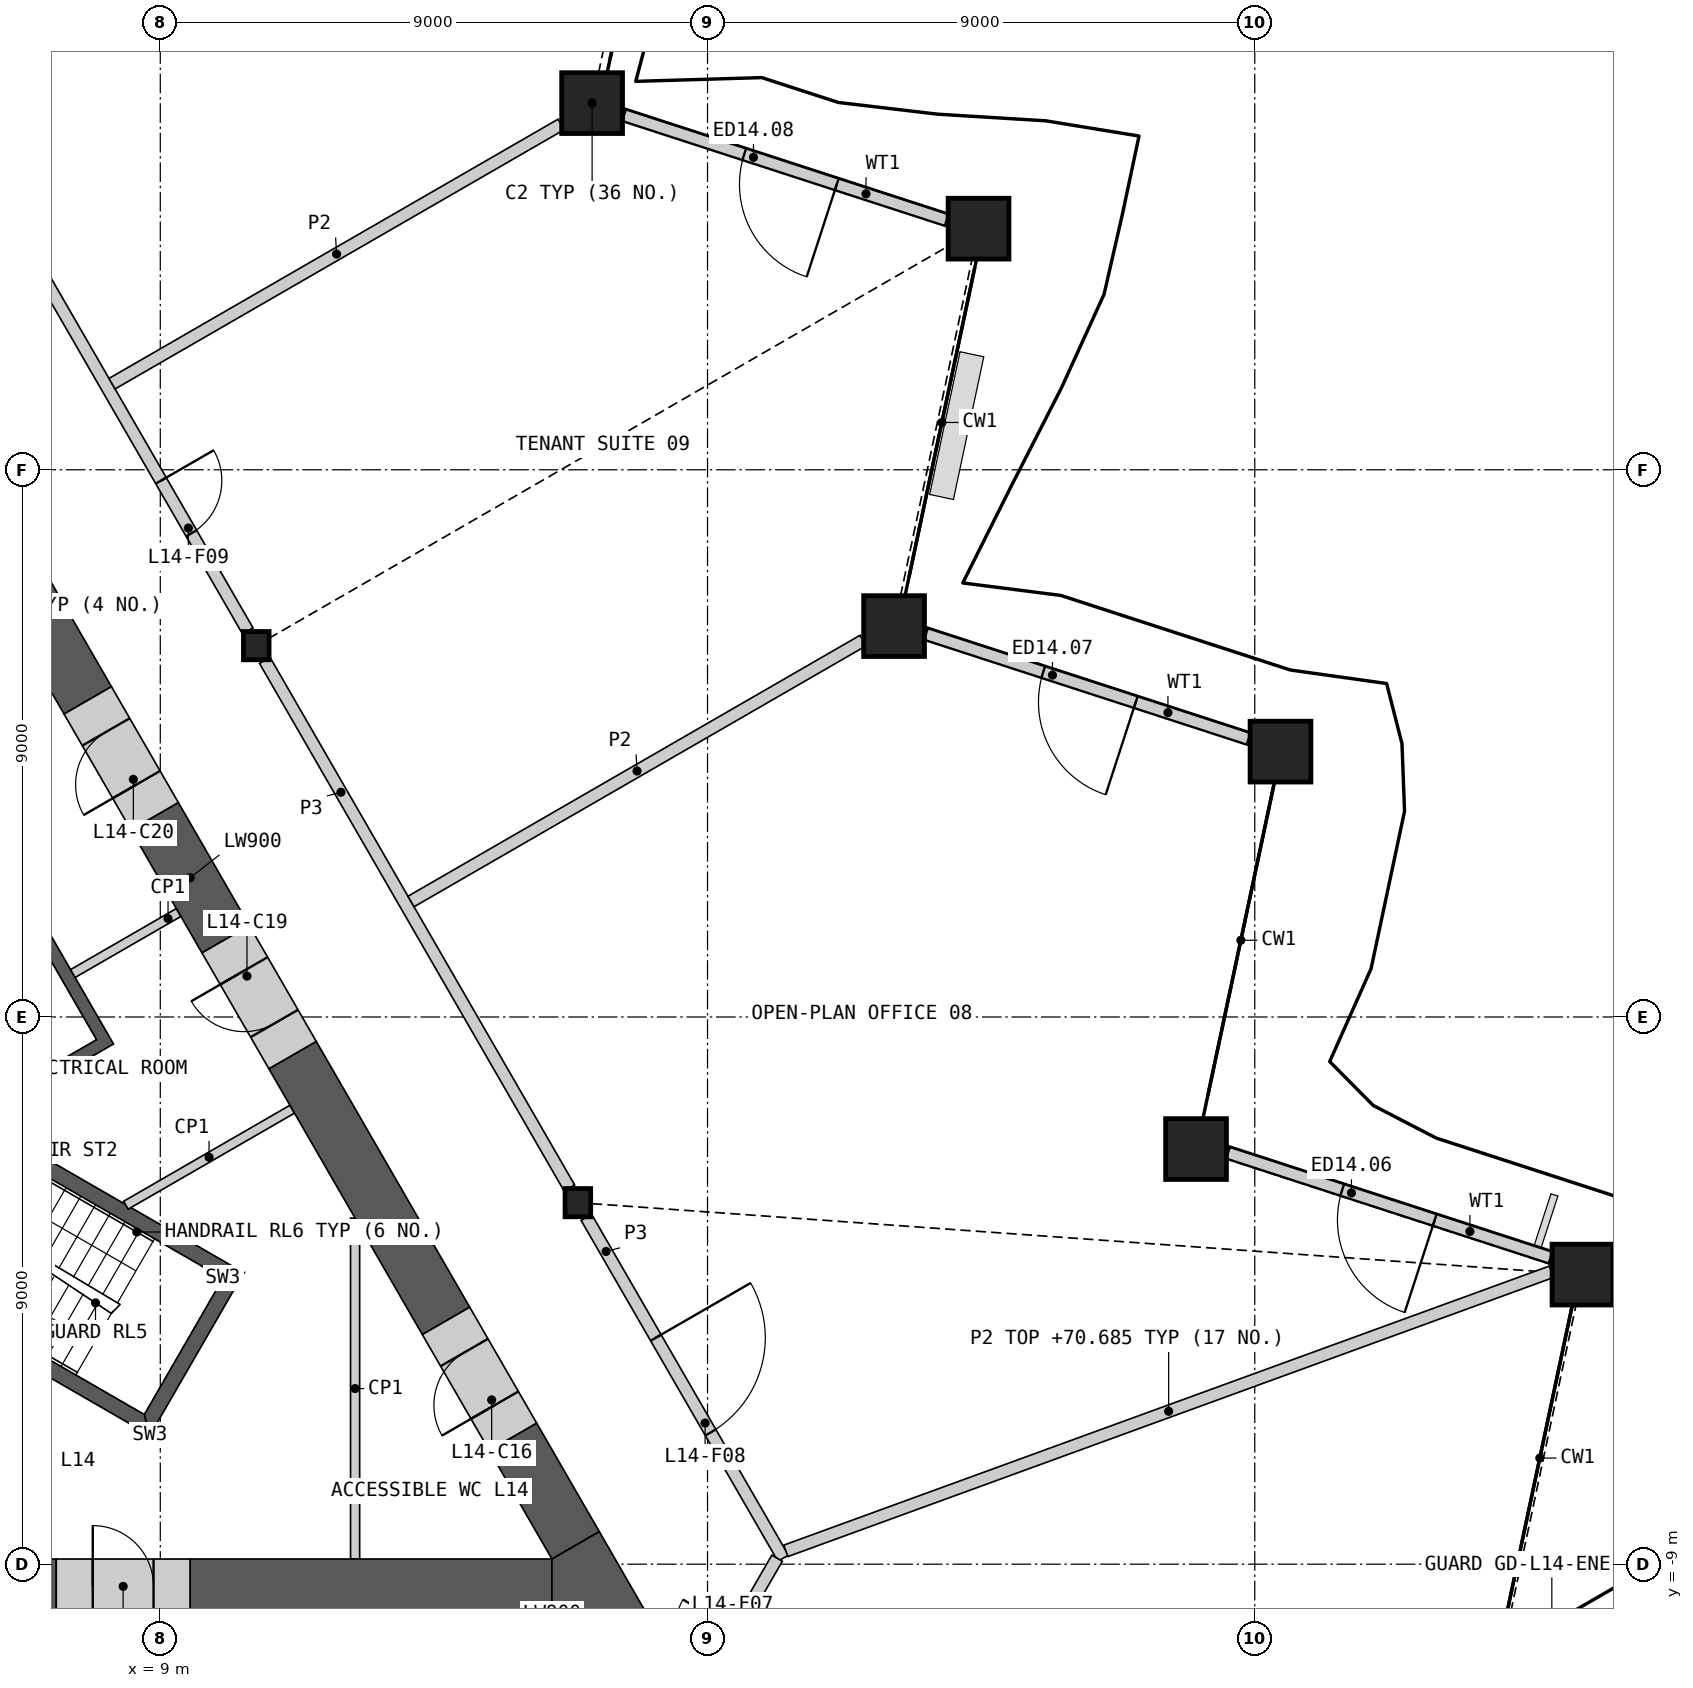
"""IFC4 building model, lengths in metres.
Left out: names, types, materials, properties, quantities, classifications, styles, units other than length and angle.
Written with IfcOpenShell. Run it as: python <this file> out.ifc"""

import sys

from ifc_helpers import new_model, si_unit, direction, frame, frame_2d, origin, origin_2d, place, context, subcontext, project, spatial, polyline, rectangle, hollow_rectangle, i_section, outline, extrude, element, fill, save


model = new_model("IFC4")
c1 = context("Model", 3, precision=1e-05, world=origin(), true_north=direction((0.0, 1.0)))
c2 = subcontext(c1, "Body", "Model", "MODEL_VIEW")
j1 = project(units=[si_unit("LENGTHUNIT", "METRE"), si_unit("PLANEANGLEUNIT", "RADIAN")], contexts=[c1])
p1 = place(None, origin())
s1 = spatial("IfcSite", under=j1, at=p1, CompositionType="ELEMENT")
p2 = place(p1, origin())
s2 = spatial("IfcBuilding", under=s1, at=p2, CompositionType="ELEMENT")
p3 = place(p2, frame((0.0, 0.0, 67.8)))
s3 = spatial("IfcBuildingStorey", under=s2, at=p3, CompositionType="ELEMENT", Elevation=67.8)
for number, where, z_axis, x_axis in (
    (1, (32.389, -4.237, 0.0), (0.0, 0.0, 1.0), (1.0, 0.0, 0.0)),
    (2, (26.034, -2.172, 0.0), (0.0, 0.0, 1.0), (1.0, 0.0, 0.0)),
    (3, (27.423, 4.364, 0.0), (0.0, 0.0, 1.0), (1.0, 0.0, 0.0)),
    (4, (21.068, 6.429, 0.0), (0.0, 0.0, 1.0), (1.0, 0.0, 0.0)),
    (5, (22.457, 12.966, 0.0), (0.0, 0.0, 1.0), (1.0, 0.0, 0.0)),
    (6, (16.102, 15.031, 0.0), (0.0, 0.0, 1.0), (1.0, 0.0, 0.0)),
):
    element("IfcColumn", number, at=place(p3, frame(where, z_axis=z_axis, x_axis=x_axis)), inside=s3, PredefinedType="COLUMN", context=c2, shape_type="SweptSolid", body=[
        extrude(hollow_rectangle(XDim=1.0, YDim=1.0, WallThickness=0.07, at=origin_2d()), origin(), (0.0, 0.0, 1.0), 4.2),
    ])
for number, where, z_axis, x_axis in (
    (7, (15.868, -3.054, 0.0), (0.0, 0.0, 1.0), (1.0, 0.0, 0.0)),
    (8, (10.578, 6.107, 0.0), (0.0, 0.0, 1.0), (1.0, 0.0, 0.0)),
):
    element("IfcColumn", number, at=place(p3, frame(where, z_axis=z_axis, x_axis=x_axis)), inside=s3, PredefinedType="COLUMN", context=c2, shape_type="SweptSolid", body=[
        extrude(i_section(OverallWidth=0.421, OverallDepth=0.465, WebThickness=0.045, FlangeThickness=0.072, at=origin_2d()), origin(), (0.0, 0.0, 1.0), 4.2),
    ])
p4 = place(p3, frame((31.865, -3.958, 0.0), z_axis=(0.0, 0.0, 1.0), x_axis=(-0.951066864375, 0.308985144444, 0.0)))
e9 = element("IfcWall", 9, at=p4, inside=s3, PredefinedType="SOLIDWALL", context=c2, shape_type="SweptSolid", body=[
    extrude(rectangle(XDim=5.579, YDim=0.2, at=frame_2d((2.79, 0.0))), origin(), (0.0, 0.0, 1.0), 3.189),
])
p5 = place(p4, frame((2.003, 0.0, 0.0)))
e10 = element("IfcOpeningElement", 10, at=p5, cuts=e9, PredefinedType="OPENING", context=c2, shape_type="SweptSolid", body=[
    extrude(rectangle(XDim=1.6, YDim=2.4, at=frame_2d((0.8, 1.2))), frame((0.0, 0.11, 0.0), z_axis=(0.0, -1.0, 0.0), x_axis=(1.0, 0.0, 0.0)), (0.0, 0.0, 1.0), 0.22),
])
p6 = place(p3, frame((26.899, 4.575, 0.0), z_axis=(0.0, 0.0, 1.0), x_axis=(-0.951066864375, 0.308985144444, 0.0)))
e11 = element("IfcWall", 11, at=p6, inside=s3, PredefinedType="SOLIDWALL", context=c2, shape_type="SweptSolid", body=[
    extrude(rectangle(XDim=5.579, YDim=0.2, at=frame_2d((2.79, 0.0))), origin(), (0.0, 0.0, 1.0), 3.189),
])
p7 = place(p6, frame((1.952, 0.0, 0.0)))
e12 = element("IfcOpeningElement", 12, at=p7, cuts=e11, PredefinedType="OPENING", context=c2, shape_type="SweptSolid", body=[
    extrude(rectangle(XDim=1.6, YDim=2.4, at=frame_2d((0.8, 1.2))), frame((0.0, 0.11, 0.0), z_axis=(0.0, -1.0, 0.0), x_axis=(1.0, 0.0, 0.0)), (0.0, 0.0, 1.0), 0.22),
])
p8 = place(p3, frame((21.933, 13.107, 0.0), z_axis=(0.0, 0.0, 1.0), x_axis=(-0.951066864375, 0.308985144444, 0.0)))
e13 = element("IfcWall", 13, at=p8, inside=s3, PredefinedType="SOLIDWALL", context=c2, shape_type="SweptSolid", body=[
    extrude(rectangle(XDim=5.579, YDim=0.2, at=frame_2d((2.79, 0.0))), origin(), (0.0, 0.0, 1.0), 3.189),
])
p9 = place(p8, frame((1.9, 0.0, 0.0)))
e14 = element("IfcOpeningElement", 14, at=p9, cuts=e13, PredefinedType="OPENING", context=c2, shape_type="SweptSolid", body=[
    extrude(rectangle(XDim=1.6, YDim=2.4, at=frame_2d((0.8, 1.2))), frame((0.0, 0.11, 0.0), z_axis=(0.0, -1.0, 0.0), x_axis=(1.0, 0.0, 0.0)), (0.0, 0.0, 1.0), 0.22),
])
p10 = place(p3, origin())
e15 = element("IfcWall", 15, at=p10, inside=s3, PredefinedType="SHEAR", context=c2, shape_type="SweptSolid", body=[
    extrude(outline(polyline([(2.66, 4.192), (4.831, 5.445), (8.231, -0.444), (6.061, -1.697), (5.96, -1.524), (7.952, -0.374), (6.952, 1.358), (4.96, 0.208), (4.861, 0.381), (6.852, 1.531), (5.852, 3.263), (3.861, 2.113), (3.76, 2.287), (5.752, 3.437), (4.752, 5.169), (2.76, 4.019), (2.66, 4.192)])), origin(), (0.0, 0.0, 1.0), 3.8),
])
p11 = place(p3, origin())
e16 = element("IfcWall", 16, at=p11, inside=s3, PredefinedType="SHEAR", context=c2, shape_type="SweptSolid", body=[
    extrude(outline(polyline([(3.763, -3.956), (8.83, -6.881), (8.738, -6.539), (3.888, -3.739), (3.763, -3.956)])), origin(), (0.0, 0.0, 1.0), 3.8),
])
p12 = place(p3, origin())
e17 = element("IfcWall", 17, at=p12, inside=s3, PredefinedType="SHEAR", context=c2, shape_type="SweptSolid", body=[
    extrude(outline(polyline([(8.83, -6.881), (10.374, -4.206), (10.032, -4.298), (8.738, -6.539), (8.83, -6.881)])), origin(), (0.0, 0.0, 1.0), 3.8),
])
p13 = place(p3, origin())
e18 = element("IfcWall", 18, at=p13, inside=s3, PredefinedType="SHEAR", context=c2, shape_type="SweptSolid", body=[
    extrude(outline(polyline([(10.032, -4.298), (10.374, -4.206), (5.307, -1.281), (5.182, -1.498), (10.032, -4.298)])), origin(), (0.0, 0.0, 1.0), 3.8),
])
p14 = place(p3, frame((9.302, 1.719, 0.0), z_axis=(0.0, 0.0, 1.0), x_axis=(-0.866035824272, -0.499981950752, 0.0)))
e19 = element("IfcWall", 19, at=p14, inside=s3, PredefinedType="PARTITIONING", context=c2, shape_type="SweptSolid", body=[
    extrude(rectangle(XDim=2.009, YDim=0.15, at=frame_2d((1.004, 0.0))), origin(), (0.0, 0.0, 1.0), 3.8),
])
p15 = place(p3, frame((11.17, -1.517, 0.0), z_axis=(0.0, 0.0, 1.0), x_axis=(-0.866037599206, -0.499978876315, 0.0)))
e20 = element("IfcWall", 20, at=p15, inside=s3, PredefinedType="PARTITIONING", context=c2, shape_type="SweptSolid", body=[
    extrude(rectangle(XDim=3.159, YDim=0.15, at=frame_2d((1.58, 0.0))), origin(), (0.0, 0.0, 1.0), 3.8),
])
p16 = place(p3, frame((12.204, -8.915, 0.0), z_axis=(0.0, 0.0, 1.0), x_axis=(0.0, 1.0, 0.0)))
e21 = element("IfcWall", 21, at=p16, inside=s3, PredefinedType="PARTITIONING", context=c2, shape_type="SweptSolid", body=[
    extrude(rectangle(XDim=5.607, YDim=0.15, at=frame_2d((2.804, 0.0))), origin(), (0.0, 0.0, 1.0), 3.8),
])
p17 = place(p3, frame((1.1, -9.365, 0.0), z_axis=(0.0, 0.0, 1.0), x_axis=(1.0, 0.0, 0.0)))
e22 = element("IfcWall", 22, at=p17, inside=s3, PredefinedType="SHEAR", context=c2, shape_type="SweptSolid", body=[
    extrude(rectangle(XDim=6.189, YDim=0.9, at=frame_2d((3.095, 0.0))), origin(), (0.0, 0.0, 1.0), 3.8),
])
p18 = place(p3, frame((9.49, -9.365, 0.0), z_axis=(0.0, 0.0, 1.0), x_axis=(1.0, 0.0, 0.0)))
e23 = element("IfcWall", 23, at=p18, inside=s3, PredefinedType="SHEAR", context=c2, shape_type="SweptSolid", body=[
    extrude(rectangle(XDim=5.952, YDim=0.9, at=frame_2d((2.976, 0.0))), origin(), (0.0, 0.0, 1.0), 3.8),
])
p19 = place(p3, frame((7.807, 5.208, 0.0), z_axis=(0.0, 0.0, 1.0), x_axis=(-0.499986664161, 0.866033103098, 0.0)))
e24 = element("IfcWall", 24, at=p19, inside=s3, PredefinedType="SHEAR", context=c2, shape_type="SweptSolid", body=[
    extrude(rectangle(XDim=6.586, YDim=0.9, at=frame_2d((3.293, 0.0))), origin(), (0.0, 0.0, 1.0), 3.8),
])
p20 = place(p3, frame((13.7, -4.999, 0.0), z_axis=(0.0, 0.0, 1.0), x_axis=(-0.499993158726, 0.86602935356, 0.0)))
e25 = element("IfcWall", 25, at=p20, inside=s3, PredefinedType="SHEAR", context=c2, shape_type="SweptSolid", body=[
    extrude(rectangle(XDim=5.048, YDim=0.9, at=frame_2d((2.524, 0.0))), origin(), (0.0, 0.0, 1.0), 3.8),
])
p21 = place(p3, frame((10.075, 1.279, 0.0), z_axis=(0.0, 0.0, 1.0), x_axis=(-0.500026924946, 0.866009858102, 0.0)))
e26 = element("IfcWall", 26, at=p21, inside=s3, PredefinedType="SHEAR", context=c2, shape_type="SweptSolid", body=[
    extrude(rectangle(XDim=2.337, YDim=0.9, at=frame_2d((1.168, 0.0))), origin(), (0.0, 0.0, 1.0), 3.8),
])
p22 = place(p3, frame((15.831, -8.69, 0.0), z_axis=(0.0, 0.0, 1.0), x_axis=(-0.499971832445, 0.866041665719, 0.0)))
e27 = element("IfcWall", 27, at=p22, inside=s3, PredefinedType="SHEAR", context=c2, shape_type="SweptSolid", body=[
    extrude(rectangle(XDim=2.062, YDim=0.9, at=frame_2d((1.031, 0.0))), origin(), (0.0, 0.0, 1.0), 3.8),
])
p23 = place(p3, origin())
e28 = element("IfcWall", 28, at=p23, inside=s3, PredefinedType="SHEAR", context=c2, shape_type="SweptSolid", body=[
    extrude(outline(polyline([(15.441, -9.815), (15.441, -8.915), (16.221, -8.465), (17.0, -9.815), (15.441, -9.815)])), origin(), (0.0, 0.0, 1.0), 3.8),
])
p24 = place(p3, frame((14.8, -6.904, 0.0), z_axis=(0.0, 0.0, 1.0), x_axis=(-0.50002983664, 0.866008176907, 0.0)))
e29 = element("IfcWall", 29, at=p24, inside=s3, PredefinedType="SHEAR", context=c2, shape_type="SweptSolid", body=[
    extrude(rectangle(XDim=2.2, YDim=0.9, at=frame_2d((1.1, 0.0))), origin(), (0.0, 0.0, 1.0), 3.8),
])
p25 = place(p24, frame((0.6, 0.0, 0.0)))
e30 = element("IfcOpeningElement", 30, at=p25, cuts=e29, PredefinedType="OPENING", context=c2, shape_type="SweptSolid", body=[
    extrude(rectangle(XDim=1.0, YDim=2.1, at=frame_2d((0.5, 1.05))), frame((0.0, 0.46, 0.0), z_axis=(0.0, -1.0, 0.0), x_axis=(1.0, 0.0, 0.0)), (0.0, 0.0, 1.0), 0.92),
])
p26 = place(p3, frame((7.289, -9.365, 0.0), z_axis=(0.0, 0.0, 1.0), x_axis=(1.0, 0.0, 0.0)))
e31 = element("IfcWall", 31, at=p26, inside=s3, PredefinedType="SHEAR", context=c2, shape_type="SweptSolid", body=[
    extrude(rectangle(XDim=2.2, YDim=0.9, at=frame_2d((1.1, 0.0))), origin(), (0.0, 0.0, 1.0), 3.8),
])
p27 = place(p26, frame((0.6, 0.0, 0.0)))
e32 = element("IfcOpeningElement", 32, at=p27, cuts=e31, PredefinedType="OPENING", context=c2, shape_type="SweptSolid", body=[
    extrude(rectangle(XDim=1.0, YDim=2.1, at=frame_2d((0.5, 1.05))), frame((0.0, 0.46, 0.0), z_axis=(0.0, -1.0, 0.0), x_axis=(1.0, 0.0, 0.0)), (0.0, 0.0, 1.0), 0.92),
])
p28 = place(p3, frame((11.176, -0.627, 0.0), z_axis=(0.0, 0.0, 1.0), x_axis=(-0.499946605688, 0.86605622881, 0.0)))
e33 = element("IfcWall", 33, at=p28, inside=s3, PredefinedType="SHEAR", context=c2, shape_type="SweptSolid", body=[
    extrude(rectangle(XDim=2.2, YDim=0.9, at=frame_2d((1.1, 0.0))), origin(), (0.0, 0.0, 1.0), 3.8),
])
p29 = place(p28, frame((0.6, 0.0, 0.0)))
e34 = element("IfcOpeningElement", 34, at=p29, cuts=e33, PredefinedType="OPENING", context=c2, shape_type="SweptSolid", body=[
    extrude(rectangle(XDim=1.0, YDim=2.1, at=frame_2d((0.5, 1.05))), frame((0.0, 0.46, 0.0), z_axis=(0.0, -1.0, 0.0), x_axis=(1.0, 0.0, 0.0)), (0.0, 0.0, 1.0), 0.92),
])
p30 = place(p3, frame((8.907, 3.302, 0.0), z_axis=(0.0, 0.0, 1.0), x_axis=(-0.50002983664, 0.866008176907, 0.0)))
e35 = element("IfcWall", 35, at=p30, inside=s3, PredefinedType="SHEAR", context=c2, shape_type="SweptSolid", body=[
    extrude(rectangle(XDim=2.2, YDim=0.9, at=frame_2d((1.1, 0.0))), origin(), (0.0, 0.0, 1.0), 3.8),
])
p31 = place(p30, frame((0.6, 0.0, 0.0)))
e36 = element("IfcOpeningElement", 36, at=p31, cuts=e35, PredefinedType="OPENING", context=c2, shape_type="SweptSolid", body=[
    extrude(rectangle(XDim=1.0, YDim=2.1, at=frame_2d((0.5, 1.05))), frame((0.0, 0.46, 0.0), z_axis=(0.0, -1.0, 0.0), x_axis=(1.0, 0.0, 0.0)), (0.0, 0.0, 1.0), 0.92),
])
p32 = place(p3, frame((10.719, 5.865, 0.0), z_axis=(0.0, 0.0, 1.0), x_axis=(0.49999175339, -0.866030164915, 0.0)))
e37 = element("IfcWall", 37, at=p32, inside=s3, PredefinedType="PARTITIONING", context=c2, shape_type="SweptSolid", body=[
    extrude(rectangle(XDim=10.019, YDim=0.2, at=frame_2d((5.009, 0.0))), origin(), (0.0, 0.0, 1.0), 3.8),
])
p33 = place(p3, frame((5.429, 15.026, 0.0), z_axis=(0.0, 0.0, 1.0), x_axis=(0.50001002959, -0.86601961312, 0.0)))
e38 = element("IfcWall", 38, at=p33, inside=s3, PredefinedType="PARTITIONING", context=c2, shape_type="SweptSolid", body=[
    extrude(rectangle(XDim=10.019, YDim=0.2, at=frame_2d((5.009, 0.0))), origin(), (0.0, 0.0, 1.0), 3.8),
])
p34 = place(p33, frame((7.165, 0.0, 0.0)))
e39 = element("IfcOpeningElement", 39, at=p34, cuts=e38, PredefinedType="OPENING", context=c2, shape_type="SweptSolid", body=[
    extrude(rectangle(XDim=1.0, YDim=2.1, at=frame_2d((0.5, 1.05))), frame((0.0, 0.11, 0.0), z_axis=(0.0, -1.0, 0.0), x_axis=(1.0, 0.0, 0.0)), (0.0, 0.0, 1.0), 0.22),
])
p35 = place(p3, frame((16.008, -3.296, 0.0), z_axis=(0.0, 0.0, 1.0), x_axis=(0.499984737558, -0.86603421538, 0.0)))
e40 = element("IfcWall", 40, at=p35, inside=s3, PredefinedType="PARTITIONING", context=c2, shape_type="SweptSolid", body=[
    extrude(rectangle(XDim=6.473, YDim=0.2, at=frame_2d((3.236, 0.0))), origin(), (0.0, 0.0, 1.0), 3.8),
])
p36 = place(p35, frame((2.285, 0.0, 0.0)))
e41 = element("IfcOpeningElement", 41, at=p36, cuts=e40, PredefinedType="OPENING", context=c2, shape_type="SweptSolid", body=[
    extrude(rectangle(XDim=1.8, YDim=2.1, at=frame_2d((0.9, 1.05))), frame((0.0, 0.11, 0.0), z_axis=(0.0, -1.0, 0.0), x_axis=(1.0, 0.0, 0.0)), (0.0, 0.0, 1.0), 0.22),
])
p37 = place(p3, frame((17.281, -12.128, 0.0), z_axis=(0.0, 0.0, 1.0), x_axis=(0.499958791762, 0.866049194065, 0.0)))
e42 = element("IfcWall", 42, at=p37, inside=s3, PredefinedType="PARTITIONING", context=c2, shape_type="SweptSolid", body=[
    extrude(rectangle(XDim=3.726, YDim=0.2, at=frame_2d((1.863, 0.0))), origin(), (0.0, 0.0, 1.0), 3.8),
])
p38 = place(p37, frame((1.363, 0.0, 0.0)))
e43 = element("IfcOpeningElement", 43, at=p38, cuts=e42, PredefinedType="OPENING", context=c2, shape_type="SweptSolid", body=[
    extrude(rectangle(XDim=1.0, YDim=2.1, at=frame_2d((0.5, 1.05))), frame((0.0, 0.11, 0.0), z_axis=(0.0, -1.0, 0.0), x_axis=(1.0, 0.0, 0.0)), (0.0, 0.0, 1.0), 0.22),
])
p39 = place(p3, frame((19.288, -8.781, 0.0), z_axis=(0.0, 0.0, 1.0), x_axis=(0.939515478087, 0.34250644729, 0.0)))
e44 = element("IfcWall", 44, at=p39, inside=s3, PredefinedType="PARTITIONING", context=c2, shape_type="SweptSolid", body=[
    extrude(rectangle(XDim=13.402, YDim=0.2, at=frame_2d((6.701, 0.0))), origin(), (0.0, 0.0, 1.0), 2.885),
])
p40 = place(p3, frame((13.124, 1.899, 0.0), z_axis=(0.0, 0.0, 1.0), x_axis=(0.866024086673, 0.500002281298, 0.0)))
e45 = element("IfcWall", 45, at=p40, inside=s3, PredefinedType="PARTITIONING", context=c2, shape_type="SweptSolid", body=[
    extrude(rectangle(XDim=8.584, YDim=0.2, at=frame_2d((4.292, 0.0))), origin(), (0.0, 0.0, 1.0), 2.885),
])
p41 = place(p3, frame((8.207, 10.416, 0.0), z_axis=(0.0, 0.0, 1.0), x_axis=(0.866023490266, 0.500003314297, 0.0)))
e46 = element("IfcWall", 46, at=p41, inside=s3, PredefinedType="PARTITIONING", context=c2, shape_type="SweptSolid", body=[
    extrude(rectangle(XDim=8.528, YDim=0.2, at=frame_2d((4.264, 0.0))), origin(), (0.0, 0.0, 1.0), 2.885),
])
p42 = place(p5, origin())
e47 = element("IfcDoor", 47, at=p42, inside=s3, OperationType="DOUBLE_DOOR_SINGLE_SWING", PredefinedType="DOOR", context=c2, shape_type="SweptSolid", body=[
    extrude(rectangle(XDim=1.6, YDim=2.4, at=frame_2d((0.8, 1.2))), frame((0.0, 0.025, 0.0), z_axis=(0.0, -1.0, 0.0), x_axis=(1.0, 0.0, 0.0)), (0.0, 0.0, 1.0), 0.05),
])
fill(e10, e47)
p43 = place(p7, origin())
e48 = element("IfcDoor", 48, at=p43, inside=s3, OperationType="DOUBLE_DOOR_SINGLE_SWING", PredefinedType="DOOR", context=c2, shape_type="SweptSolid", body=[
    extrude(rectangle(XDim=1.6, YDim=2.4, at=frame_2d((0.8, 1.2))), frame((0.0, 0.025, 0.0), z_axis=(0.0, -1.0, 0.0), x_axis=(1.0, 0.0, 0.0)), (0.0, 0.0, 1.0), 0.05),
])
fill(e12, e48)
p44 = place(p9, origin())
e49 = element("IfcDoor", 49, at=p44, inside=s3, OperationType="DOUBLE_DOOR_SINGLE_SWING", PredefinedType="DOOR", context=c2, shape_type="SweptSolid", body=[
    extrude(rectangle(XDim=1.6, YDim=2.4, at=frame_2d((0.8, 1.2))), frame((0.0, 0.025, 0.0), z_axis=(0.0, -1.0, 0.0), x_axis=(1.0, 0.0, 0.0)), (0.0, 0.0, 1.0), 0.05),
])
fill(e14, e49)
p45 = place(p25, origin())
e50 = element("IfcDoor", 50, at=p45, inside=s3, OperationType="SINGLE_SWING_LEFT", PredefinedType="DOOR", context=c2, shape_type="SweptSolid", body=[
    extrude(rectangle(XDim=1.0, YDim=2.1, at=frame_2d((0.5, 1.05))), frame((0.0, 0.205, 0.0), z_axis=(0.0, -1.0, 0.0), x_axis=(1.0, 0.0, 0.0)), (0.0, 0.0, 1.0), 0.05),
])
fill(e30, e50)
p46 = place(p27, origin())
e51 = element("IfcDoor", 51, at=p46, inside=s3, OperationType="SINGLE_SWING_LEFT", PredefinedType="DOOR", context=c2, shape_type="SweptSolid", body=[
    extrude(rectangle(XDim=1.0, YDim=2.1, at=frame_2d((0.5, 1.05))), frame((0.0, 0.205, 0.0), z_axis=(0.0, -1.0, 0.0), x_axis=(1.0, 0.0, 0.0)), (0.0, 0.0, 1.0), 0.05),
])
fill(e32, e51)
p47 = place(p29, origin())
e52 = element("IfcDoor", 52, at=p47, inside=s3, OperationType="SINGLE_SWING_RIGHT", PredefinedType="DOOR", context=c2, shape_type="SweptSolid", body=[
    extrude(rectangle(XDim=1.0, YDim=2.1, at=frame_2d((0.5, 1.05))), frame((0.0, 0.205, 0.0), z_axis=(0.0, -1.0, 0.0), x_axis=(1.0, 0.0, 0.0)), (0.0, 0.0, 1.0), 0.05),
])
fill(e34, e52)
p48 = place(p31, origin())
e53 = element("IfcDoor", 53, at=p48, inside=s3, OperationType="SINGLE_SWING_LEFT", PredefinedType="DOOR", context=c2, shape_type="SweptSolid", body=[
    extrude(rectangle(XDim=1.0, YDim=2.1, at=frame_2d((0.5, 1.05))), frame((0.0, 0.205, 0.0), z_axis=(0.0, -1.0, 0.0), x_axis=(1.0, 0.0, 0.0)), (0.0, 0.0, 1.0), 0.05),
])
fill(e36, e53)
p49 = place(p36, origin())
e54 = element("IfcDoor", 54, at=p49, inside=s3, OperationType="DOUBLE_DOOR_SINGLE_SWING", PredefinedType="DOOR", context=c2, shape_type="SweptSolid", body=[
    extrude(rectangle(XDim=1.8, YDim=2.1, at=frame_2d((0.9, 1.05))), frame((0.0, 0.025, 0.0), z_axis=(0.0, -1.0, 0.0), x_axis=(1.0, 0.0, 0.0)), (0.0, 0.0, 1.0), 0.05),
])
fill(e41, e54)
p50 = place(p34, origin())
e55 = element("IfcDoor", 55, at=p50, inside=s3, OperationType="SINGLE_SWING_LEFT", PredefinedType="DOOR", context=c2, shape_type="SweptSolid", body=[
    extrude(rectangle(XDim=1.0, YDim=2.1, at=frame_2d((0.5, 1.05))), frame((0.0, 0.025, 0.0), z_axis=(0.0, -1.0, 0.0), x_axis=(1.0, 0.0, 0.0)), (0.0, 0.0, 1.0), 0.05),
])
fill(e39, e55)
save(model, sys.argv[1])
